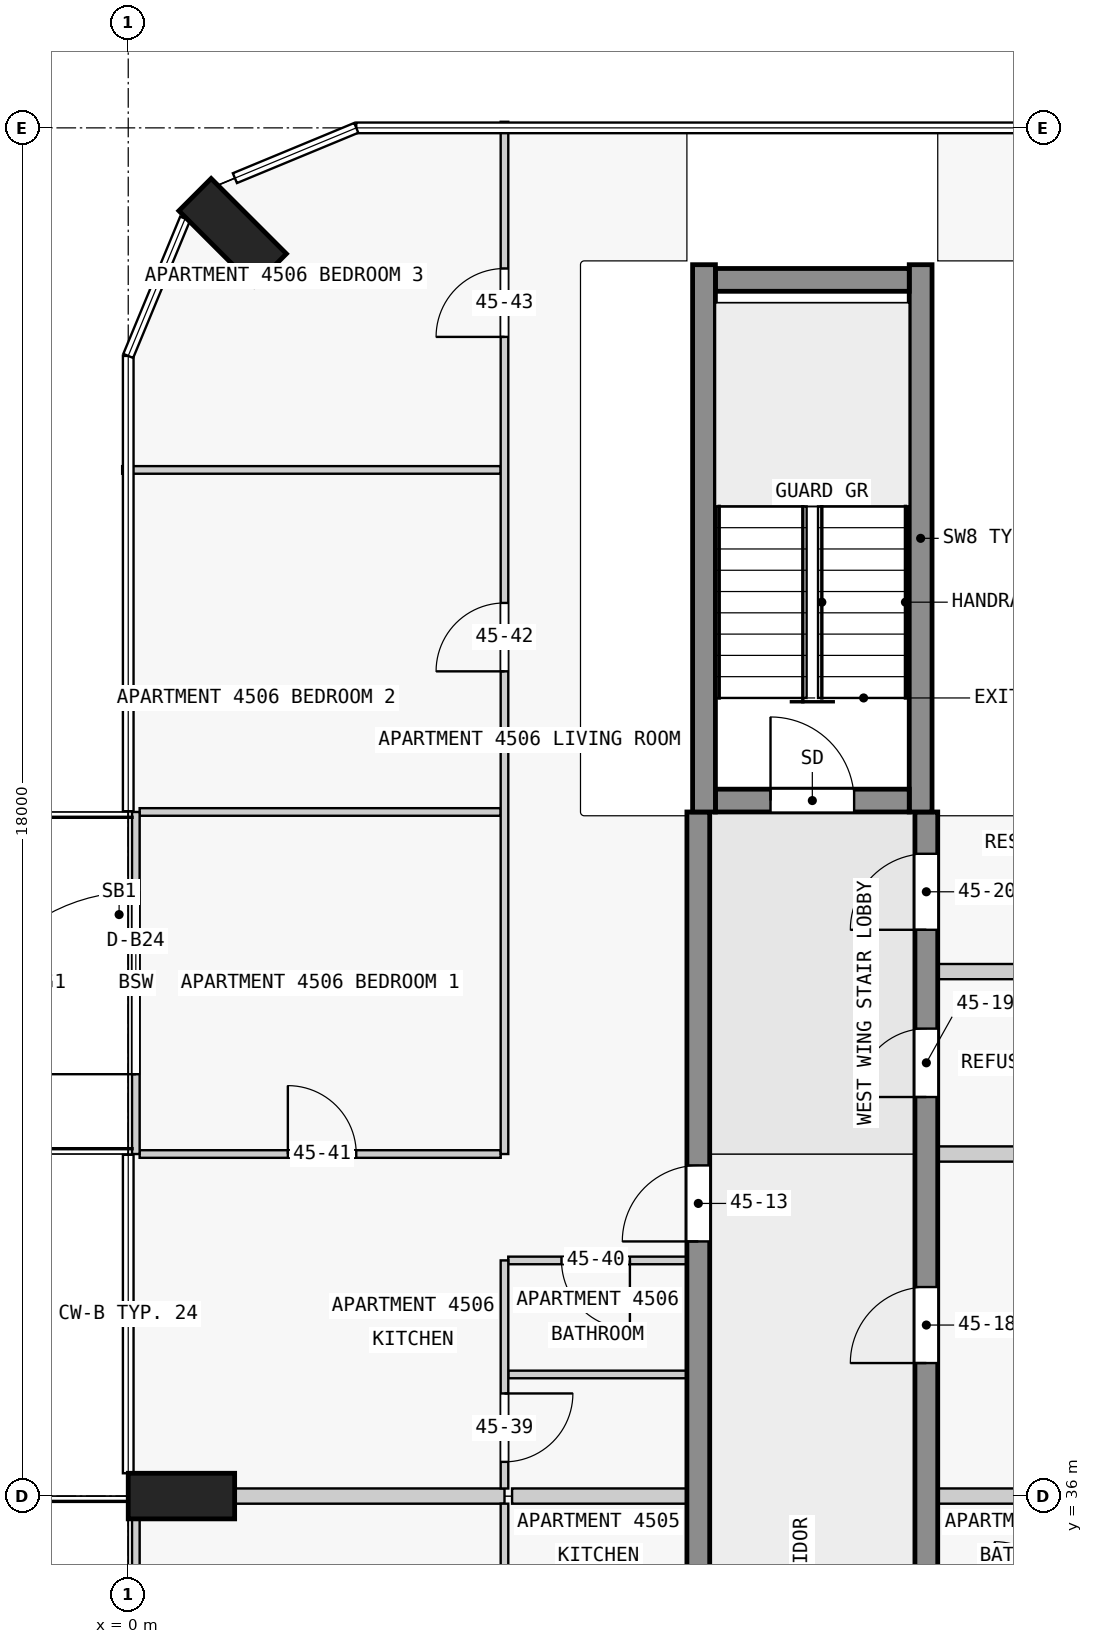
"""IFC4 building model, lengths in metres.
Left out: names, types, materials, properties, quantities, classifications, styles, units other than length and angle.
Written with IfcOpenShell. Run it as: python <this file> out.ifc"""

import sys

from ifc_helpers import new_model, si_unit, direction, frame, frame_2d, origin, origin_2d, place, context, subcontext, project, spatial, rectangle, extrude, element, fill, save


model = new_model("IFC4")
c1 = context("Model", 3, precision=1e-05, world=origin(), true_north=direction((0.0, 1.0)))
c2 = subcontext(c1, "Body", "Model", "MODEL_VIEW")
j1 = project(units=[si_unit("LENGTHUNIT", "METRE"), si_unit("PLANEANGLEUNIT", "RADIAN")], contexts=[c1])
p1 = place(None, origin())
s1 = spatial("IfcSite", under=j1, at=p1, CompositionType="ELEMENT")
p2 = place(p1, origin())
s2 = spatial("IfcBuilding", under=s1, at=p2, CompositionType="ELEMENT")
p3 = place(p2, frame((0.0, 0.0, 174.4)))
s3 = spatial("IfcBuildingStorey", under=s2, at=p3, CompositionType="ELEMENT", Elevation=174.4)
for number, where, z_axis, x_axis in (
    (1, (1.374, 52.626, 0.0), (0.0, 0.0, 1.0), (0.707, 0.707, 0.0)),
    (2, (0.7, 36.0, 0.0), (0.0, 0.0, 1.0), (0.0, 1.0, 0.0)),
):
    element("IfcColumn", number, at=place(p3, frame(where, z_axis=z_axis, x_axis=x_axis)), inside=s3, PredefinedType="COLUMN", context=c2, shape_type="SweptSolid", body=[
        extrude(rectangle(XDim=0.6, YDim=1.4, at=origin_2d()), origin(), (0.0, 0.0, 1.0), 3.5),
    ])
p4 = place(p3, frame((7.725, 45.15, 0.0), z_axis=(0.0, 0.0, 1.0), x_axis=(1.0, 0.0, 0.0)))
e3 = element("IfcWall", 3, at=p4, inside=s3, PredefinedType="SHEAR", context=c2, shape_type="SweptSolid", body=[
    extrude(rectangle(XDim=2.55, YDim=0.3, at=frame_2d((1.275, 0.0))), origin(), (0.0, 0.0, 1.0), 3.5),
])
p5 = place(p4, frame((0.725, 0.0, 0.0)))
e4 = element("IfcOpeningElement", 4, at=p5, cuts=e3, PredefinedType="OPENING", context=c2, shape_type="SweptSolid", body=[
    extrude(rectangle(XDim=1.1, YDim=2.1, at=frame_2d((0.55, 1.05))), frame((0.0, 0.16, 0.0), z_axis=(0.0, -1.0, 0.0), x_axis=(1.0, 0.0, 0.0)), (0.0, 0.0, 1.0), 0.32),
])
p6 = place(p3, frame((7.725, 52.0, 0.0), z_axis=(0.0, 0.0, 1.0), x_axis=(1.0, 0.0, 0.0)))
e5 = element("IfcWall", 5, at=p6, inside=s3, PredefinedType="SHEAR", context=c2, shape_type="SweptSolid", body=[
    extrude(rectangle(XDim=2.55, YDim=0.3, at=frame_2d((1.275, 0.0))), origin(), (0.0, 0.0, 1.0), 3.5),
])
for number, where, z_axis, x_axis in (
    (6, (7.575, 45.0, 0.0), (0.0, 0.0, 1.0), (0.0, 1.0, 0.0)),
    (7, (10.425, 45.0, 0.0), (0.0, 0.0, 1.0), (0.0, 1.0, 0.0)),
):
    element("IfcWall", number, at=place(p3, frame(where, z_axis=z_axis, x_axis=x_axis)), inside=s3, PredefinedType="SHEAR", context=c2, shape_type="SweptSolid", body=[
        extrude(rectangle(XDim=7.2, YDim=0.3, at=frame_2d((3.6, 0.0))), origin(), (0.0, 0.0, 1.0), 3.5),
    ])
p7 = place(p3, frame((7.5, 18.0, 0.0), z_axis=(0.0, 0.0, 1.0), x_axis=(0.0, 1.0, 0.0)))
e8 = element("IfcWall", 8, at=p7, inside=s3, PredefinedType="SHEAR", context=c2, shape_type="SweptSolid", body=[
    extrude(rectangle(XDim=27.0, YDim=0.3, at=frame_2d((13.5, 0.0))), origin(), (0.0, 0.0, 1.0), 3.25),
])
p8 = place(p7, frame((1.75, 0.0, 0.0)))
e9 = element("IfcOpeningElement", 9, at=p8, cuts=e8, PredefinedType="OPENING", context=c2, shape_type="SweptSolid", body=[
    extrude(rectangle(XDim=1.0, YDim=2.1, at=frame_2d((0.5, 1.05))), frame((0.0, 0.16, 0.0), z_axis=(0.0, -1.0, 0.0), x_axis=(1.0, 0.0, 0.0)), (0.0, 0.0, 1.0), 0.32),
])
p9 = place(p7, frame((5.85, 0.0, 0.0)))
e10 = element("IfcOpeningElement", 10, at=p9, cuts=e8, PredefinedType="OPENING", context=c2, shape_type="SweptSolid", body=[
    extrude(rectangle(XDim=1.8, YDim=2.1, at=frame_2d((0.9, 1.05))), frame((0.0, 0.16, 0.0), z_axis=(0.0, -1.0, 0.0), x_axis=(1.0, 0.0, 0.0)), (0.0, 0.0, 1.0), 0.32),
])
p10 = place(p7, frame((13.05, 0.0, 0.0)))
e11 = element("IfcOpeningElement", 11, at=p10, cuts=e8, PredefinedType="OPENING", context=c2, shape_type="SweptSolid", body=[
    extrude(rectangle(XDim=1.0, YDim=2.1, at=frame_2d((0.5, 1.05))), frame((0.0, 0.16, 0.0), z_axis=(0.0, -1.0, 0.0), x_axis=(1.0, 0.0, 0.0)), (0.0, 0.0, 1.0), 0.32),
])
p11 = place(p7, frame((21.35, 0.0, 0.0)))
e12 = element("IfcOpeningElement", 12, at=p11, cuts=e8, PredefinedType="OPENING", context=c2, shape_type="SweptSolid", body=[
    extrude(rectangle(XDim=1.0, YDim=2.1, at=frame_2d((0.5, 1.05))), frame((0.0, 0.16, 0.0), z_axis=(0.0, -1.0, 0.0), x_axis=(1.0, 0.0, 0.0)), (0.0, 0.0, 1.0), 0.32),
])
p12 = place(p3, frame((10.5, 18.0, 0.0), z_axis=(0.0, 0.0, 1.0), x_axis=(0.0, 1.0, 0.0)))
e13 = element("IfcWall", 13, at=p12, inside=s3, PredefinedType="SHEAR", context=c2, shape_type="SweptSolid", body=[
    extrude(rectangle(XDim=27.0, YDim=0.3, at=frame_2d((13.5, 0.0))), origin(), (0.0, 0.0, 1.0), 3.25),
])
p13 = place(p12, frame((1.75, 0.0, 0.0)))
e14 = element("IfcOpeningElement", 14, at=p13, cuts=e13, PredefinedType="OPENING", context=c2, shape_type="SweptSolid", body=[
    extrude(rectangle(XDim=1.0, YDim=2.1, at=frame_2d((0.5, 1.05))), frame((0.0, 0.16, 0.0), z_axis=(0.0, -1.0, 0.0), x_axis=(1.0, 0.0, 0.0)), (0.0, 0.0, 1.0), 0.32),
])
p14 = place(p12, frame((6.25, 0.0, 0.0)))
e15 = element("IfcOpeningElement", 15, at=p14, cuts=e13, PredefinedType="OPENING", context=c2, shape_type="SweptSolid", body=[
    extrude(rectangle(XDim=1.0, YDim=2.1, at=frame_2d((0.5, 1.05))), frame((0.0, 0.16, 0.0), z_axis=(0.0, -1.0, 0.0), x_axis=(1.0, 0.0, 0.0)), (0.0, 0.0, 1.0), 0.32),
])
p15 = place(p12, frame((10.75, 0.0, 0.0)))
e16 = element("IfcOpeningElement", 16, at=p15, cuts=e13, PredefinedType="OPENING", context=c2, shape_type="SweptSolid", body=[
    extrude(rectangle(XDim=1.0, YDim=2.1, at=frame_2d((0.5, 1.05))), frame((0.0, 0.16, 0.0), z_axis=(0.0, -1.0, 0.0), x_axis=(1.0, 0.0, 0.0)), (0.0, 0.0, 1.0), 0.32),
])
p16 = place(p12, frame((15.25, 0.0, 0.0)))
e17 = element("IfcOpeningElement", 17, at=p16, cuts=e13, PredefinedType="OPENING", context=c2, shape_type="SweptSolid", body=[
    extrude(rectangle(XDim=1.0, YDim=2.1, at=frame_2d((0.5, 1.05))), frame((0.0, 0.16, 0.0), z_axis=(0.0, -1.0, 0.0), x_axis=(1.0, 0.0, 0.0)), (0.0, 0.0, 1.0), 0.32),
])
p17 = place(p12, frame((19.75, 0.0, 0.0)))
e18 = element("IfcOpeningElement", 18, at=p17, cuts=e13, PredefinedType="OPENING", context=c2, shape_type="SweptSolid", body=[
    extrude(rectangle(XDim=1.0, YDim=2.1, at=frame_2d((0.5, 1.05))), frame((0.0, 0.16, 0.0), z_axis=(0.0, -1.0, 0.0), x_axis=(1.0, 0.0, 0.0)), (0.0, 0.0, 1.0), 0.32),
])
p18 = place(p12, frame((23.25, 0.0, 0.0)))
e19 = element("IfcOpeningElement", 19, at=p18, cuts=e13, PredefinedType="OPENING", context=c2, shape_type="SweptSolid", body=[
    extrude(rectangle(XDim=0.9, YDim=2.1, at=frame_2d((0.45, 1.05))), frame((0.0, 0.16, 0.0), z_axis=(0.0, -1.0, 0.0), x_axis=(1.0, 0.0, 0.0)), (0.0, 0.0, 1.0), 0.32),
])
p19 = place(p12, frame((25.45, 0.0, 0.0)))
e20 = element("IfcOpeningElement", 20, at=p19, cuts=e13, PredefinedType="OPENING", context=c2, shape_type="SweptSolid", body=[
    extrude(rectangle(XDim=1.0, YDim=2.1, at=frame_2d((0.5, 1.05))), frame((0.0, 0.16, 0.0), z_axis=(0.0, -1.0, 0.0), x_axis=(1.0, 0.0, 0.0)), (0.0, 0.0, 1.0), 0.32),
])
p20 = place(p3, frame((0.1, 31.5, 0.0), z_axis=(0.0, 0.0, 1.0), x_axis=(0.0, 1.0, 0.0)))
e21 = element("IfcWall", 21, at=p20, inside=s3, PredefinedType="STANDARD", context=c2, shape_type="SweptSolid", body=[
    extrude(rectangle(XDim=4.5, YDim=0.1, at=frame_2d((2.25, 0.0))), origin(), (0.0, 0.0, 1.0), 3.25),
])
p21 = place(p20, frame((1.05, 0.0, 0.0)))
e22 = element("IfcOpeningElement", 22, at=p21, cuts=e21, PredefinedType="OPENING", context=c2, shape_type="SweptSolid", body=[
    extrude(rectangle(XDim=2.4, YDim=2.4, at=frame_2d((1.2, 1.2))), frame((0.0, 0.06, 0.0), z_axis=(0.0, -1.0, 0.0), x_axis=(1.0, 0.0, 0.0)), (0.0, 0.0, 1.0), 0.12),
])
p22 = place(p3, frame((0.1, 40.5, 0.0), z_axis=(0.0, 0.0, 1.0), x_axis=(0.0, 1.0, 0.0)))
e23 = element("IfcWall", 23, at=p22, inside=s3, PredefinedType="STANDARD", context=c2, shape_type="SweptSolid", body=[
    extrude(rectangle(XDim=4.5, YDim=0.1, at=frame_2d((2.25, 0.0))), origin(), (0.0, 0.0, 1.0), 3.25),
])
p23 = place(p22, frame((1.05, 0.0, 0.0)))
e24 = element("IfcOpeningElement", 24, at=p23, cuts=e23, PredefinedType="OPENING", context=c2, shape_type="SweptSolid", body=[
    extrude(rectangle(XDim=2.4, YDim=2.4, at=frame_2d((1.2, 1.2))), frame((0.0, 0.06, 0.0), z_axis=(0.0, -1.0, 0.0), x_axis=(1.0, 0.0, 0.0)), (0.0, 0.0, 1.0), 0.12),
])
for number, where, z_axis, x_axis in (
    (25, (7.35, 36.0, 0.0), (0.0, 0.0, 1.0), (-1.0, 0.0, 0.0)),
    (26, (12.95, 36.0, 0.0), (0.0, 0.0, 1.0), (-1.0, 0.0, 0.0)),
):
    element("IfcWall", number, at=place(p3, frame(where, z_axis=z_axis, x_axis=x_axis)), inside=s3, PredefinedType="PARTITIONING", context=c2, shape_type="SweptSolid", body=[
        extrude(rectangle(XDim=2.3, YDim=0.2, at=frame_2d((1.15, 0.0))), origin(), (0.0, 0.0, 1.0), 3.25),
    ])
p24 = place(p3, frame((1.4, 36.0, 0.0), z_axis=(0.0, 0.0, 1.0), x_axis=(1.0, 0.0, 0.0)))
e27 = element("IfcWall", 27, at=p24, inside=s3, PredefinedType="PARTITIONING", context=c2, shape_type="SweptSolid", body=[
    extrude(rectangle(XDim=3.55, YDim=0.2, at=frame_2d((1.775, 0.0))), origin(), (0.0, 0.0, 1.0), 3.25),
])
p25 = place(p3, frame((7.35, 37.6, 0.0), z_axis=(0.0, 0.0, 1.0), x_axis=(-1.0, 0.0, 0.0)))
e28 = element("IfcWall", 28, at=p25, inside=s3, PredefinedType="PARTITIONING", context=c2, shape_type="SweptSolid", body=[
    extrude(rectangle(XDim=2.35, YDim=0.1, at=frame_2d((1.175, 0.0))), origin(), (0.0, 0.0, 1.0), 3.25),
])
p26 = place(p3, frame((7.35, 39.1, 0.0), z_axis=(0.0, 0.0, 1.0), x_axis=(-1.0, 0.0, 0.0)))
e29 = element("IfcWall", 29, at=p26, inside=s3, PredefinedType="PARTITIONING", context=c2, shape_type="SweptSolid", body=[
    extrude(rectangle(XDim=2.35, YDim=0.1, at=frame_2d((1.175, 0.0))), origin(), (0.0, 0.0, 1.0), 3.25),
])
p27 = place(p26, frame((0.75, 0.0, 0.0)))
e30 = element("IfcOpeningElement", 30, at=p27, cuts=e29, PredefinedType="OPENING", context=c2, shape_type="SweptSolid", body=[
    extrude(rectangle(XDim=0.9, YDim=2.1, at=frame_2d((0.45, 1.05))), frame((0.0, 0.06, 0.0), z_axis=(0.0, -1.0, 0.0), x_axis=(1.0, 0.0, 0.0)), (0.0, 0.0, 1.0), 0.12),
])
p28 = place(p3, frame((0.15, 40.5, 0.0), z_axis=(0.0, 0.0, 1.0), x_axis=(1.0, 0.0, 0.0)))
e31 = element("IfcWall", 31, at=p28, inside=s3, PredefinedType="PARTITIONING", context=c2, shape_type="SweptSolid", body=[
    extrude(rectangle(XDim=4.75, YDim=0.1, at=frame_2d((2.375, 0.0))), origin(), (0.0, 0.0, 1.0), 3.25),
])
p29 = place(p28, frame((1.95, 0.0, 0.0)))
e32 = element("IfcOpeningElement", 32, at=p29, cuts=e31, PredefinedType="OPENING", context=c2, shape_type="SweptSolid", body=[
    extrude(rectangle(XDim=0.9, YDim=2.1, at=frame_2d((0.45, 1.05))), frame((0.0, 0.06, 0.0), z_axis=(0.0, -1.0, 0.0), x_axis=(1.0, 0.0, 0.0)), (0.0, 0.0, 1.0), 0.12),
])
p30 = place(p3, frame((18.08, 40.5, 0.0), z_axis=(0.0, 0.0, 1.0), x_axis=(-1.0, 0.0, 0.0)))
e33 = element("IfcWall", 33, at=p30, inside=s3, PredefinedType="PARTITIONING", context=c2, shape_type="SweptSolid", body=[
    extrude(rectangle(XDim=7.43, YDim=0.2, at=frame_2d((3.715, 0.0))), origin(), (0.0, 0.0, 1.0), 3.25),
])
p31 = place(p3, frame((13.05, 42.9, 0.0), z_axis=(0.0, 0.0, 1.0), x_axis=(-1.0, 0.0, 0.0)))
e34 = element("IfcWall", 34, at=p31, inside=s3, PredefinedType="PARTITIONING", context=c2, shape_type="SweptSolid", body=[
    extrude(rectangle(XDim=2.4, YDim=0.2, at=frame_2d((1.2, 0.0))), origin(), (0.0, 0.0, 1.0), 3.25),
])
p32 = place(p3, frame((4.9, 45.0, 0.0), z_axis=(0.0, 0.0, 1.0), x_axis=(-1.0, 0.0, 0.0)))
e35 = element("IfcWall", 35, at=p32, inside=s3, PredefinedType="PARTITIONING", context=c2, shape_type="SweptSolid", body=[
    extrude(rectangle(XDim=4.75, YDim=0.1, at=frame_2d((2.375, 0.0))), origin(), (0.0, 0.0, 1.0), 3.25),
])
p33 = place(p3, frame((4.9, 49.5, 0.0), z_axis=(0.0, 0.0, 1.0), x_axis=(-1.0, 0.0, 0.0)))
e36 = element("IfcWall", 36, at=p33, inside=s3, PredefinedType="PARTITIONING", context=c2, shape_type="SweptSolid", body=[
    extrude(rectangle(XDim=4.98, YDim=0.1, at=frame_2d((2.49, 0.0))), origin(), (0.0, 0.0, 1.0), 3.25),
])
p34 = place(p3, frame((4.95, 35.9, 0.0), z_axis=(0.0, 0.0, 1.0), x_axis=(0.0, -1.0, 0.0)))
e37 = element("IfcWall", 37, at=p34, inside=s3, PredefinedType="PARTITIONING", context=c2, shape_type="SweptSolid", body=[
    extrude(rectangle(XDim=1.7, YDim=0.1, at=frame_2d((0.85, 0.0))), origin(), (0.0, 0.0, 1.0), 3.25),
])
p35 = place(p3, frame((4.95, 39.1, 0.0), z_axis=(0.0, 0.0, 1.0), x_axis=(0.0, -1.0, 0.0)))
e38 = element("IfcWall", 38, at=p35, inside=s3, PredefinedType="PARTITIONING", context=c2, shape_type="SweptSolid", body=[
    extrude(rectangle(XDim=3.0, YDim=0.1, at=frame_2d((1.5, 0.0))), origin(), (0.0, 0.0, 1.0), 3.25),
])
p36 = place(p35, frame((1.75, 0.0, 0.0)))
e39 = element("IfcOpeningElement", 39, at=p36, cuts=e38, PredefinedType="OPENING", context=c2, shape_type="SweptSolid", body=[
    extrude(rectangle(XDim=0.9, YDim=2.1, at=frame_2d((0.45, 1.05))), frame((0.0, 0.06, 0.0), z_axis=(0.0, -1.0, 0.0), x_axis=(1.0, 0.0, 0.0)), (0.0, 0.0, 1.0), 0.12),
])
p37 = place(p3, frame((4.95, 40.5, 0.0), z_axis=(0.0, 0.0, 1.0), x_axis=(0.0, 1.0, 0.0)))
e40 = element("IfcWall", 40, at=p37, inside=s3, PredefinedType="PARTITIONING", context=c2, shape_type="SweptSolid", body=[
    extrude(rectangle(XDim=13.58, YDim=0.1, at=frame_2d((6.79, 0.0))), origin(), (0.0, 0.0, 1.0), 3.25),
])
p38 = place(p37, frame((6.35, 0.0, 0.0)))
e41 = element("IfcOpeningElement", 41, at=p38, cuts=e40, PredefinedType="OPENING", context=c2, shape_type="SweptSolid", body=[
    extrude(rectangle(XDim=0.9, YDim=2.1, at=frame_2d((0.45, 1.05))), frame((0.0, 0.06, 0.0), z_axis=(0.0, -1.0, 0.0), x_axis=(1.0, 0.0, 0.0)), (0.0, 0.0, 1.0), 0.12),
])
p39 = place(p37, frame((10.75, 0.0, 0.0)))
e42 = element("IfcOpeningElement", 42, at=p39, cuts=e40, PredefinedType="OPENING", context=c2, shape_type="SweptSolid", body=[
    extrude(rectangle(XDim=0.9, YDim=2.1, at=frame_2d((0.45, 1.05))), frame((0.0, 0.06, 0.0), z_axis=(0.0, -1.0, 0.0), x_axis=(1.0, 0.0, 0.0)), (0.0, 0.0, 1.0), 0.12),
])
p40 = place(p23, origin())
e43 = element("IfcDoor", 43, at=p40, inside=s3, OperationType="SINGLE_SWING_LEFT", PredefinedType="DOOR", context=c2, shape_type="SweptSolid", body=[
    extrude(rectangle(XDim=2.4, YDim=2.4, at=frame_2d((1.2, 1.2))), frame((0.0, 0.025, 0.0), z_axis=(0.0, -1.0, 0.0), x_axis=(1.0, 0.0, 0.0)), (0.0, 0.0, 1.0), 0.05),
])
fill(e24, e43)
p41 = place(p5, origin())
e44 = element("IfcDoor", 44, at=p41, inside=s3, OperationType="SINGLE_SWING_LEFT", PredefinedType="DOOR", context=c2, shape_type="SweptSolid", body=[
    extrude(rectangle(XDim=1.1, YDim=2.1, at=frame_2d((0.55, 1.05))), frame((0.0, 0.025, 0.0), z_axis=(0.0, -1.0, 0.0), x_axis=(1.0, 0.0, 0.0)), (0.0, 0.0, 1.0), 0.05),
])
fill(e4, e44)
p42 = place(p11, origin())
e45 = element("IfcDoor", 45, at=p42, inside=s3, OperationType="SINGLE_SWING_RIGHT", PredefinedType="DOOR", context=c2, shape_type="SweptSolid", body=[
    extrude(rectangle(XDim=1.0, YDim=2.1, at=frame_2d((0.5, 1.05))), frame((0.0, 0.025, 0.0), z_axis=(0.0, -1.0, 0.0), x_axis=(1.0, 0.0, 0.0)), (0.0, 0.0, 1.0), 0.05),
])
fill(e12, e45)
p43 = place(p17, origin())
e46 = element("IfcDoor", 46, at=p43, inside=s3, OperationType="SINGLE_SWING_RIGHT", PredefinedType="DOOR", context=c2, shape_type="SweptSolid", body=[
    extrude(rectangle(XDim=1.0, YDim=2.1, at=frame_2d((0.5, 1.05))), frame((0.0, 0.025, 0.0), z_axis=(0.0, -1.0, 0.0), x_axis=(1.0, 0.0, 0.0)), (0.0, 0.0, 1.0), 0.05),
])
fill(e18, e46)
p44 = place(p18, origin())
e47 = element("IfcDoor", 47, at=p44, inside=s3, OperationType="SINGLE_SWING_RIGHT", PredefinedType="DOOR", context=c2, shape_type="SweptSolid", body=[
    extrude(rectangle(XDim=0.9, YDim=2.1, at=frame_2d((0.45, 1.05))), frame((0.0, 0.025, 0.0), z_axis=(0.0, -1.0, 0.0), x_axis=(1.0, 0.0, 0.0)), (0.0, 0.0, 1.0), 0.05),
])
fill(e19, e47)
p45 = place(p19, origin())
e48 = element("IfcDoor", 48, at=p45, inside=s3, OperationType="SINGLE_SWING_RIGHT", PredefinedType="DOOR", context=c2, shape_type="SweptSolid", body=[
    extrude(rectangle(XDim=1.0, YDim=2.1, at=frame_2d((0.5, 1.05))), frame((0.0, 0.025, 0.0), z_axis=(0.0, -1.0, 0.0), x_axis=(1.0, 0.0, 0.0)), (0.0, 0.0, 1.0), 0.05),
])
fill(e20, e48)
p46 = place(p36, origin())
e49 = element("IfcDoor", 49, at=p46, inside=s3, OperationType="SINGLE_SWING_RIGHT", PredefinedType="DOOR", context=c2, shape_type="SweptSolid", body=[
    extrude(rectangle(XDim=0.9, YDim=2.1, at=frame_2d((0.45, 1.05))), frame((0.0, 0.025, 0.0), z_axis=(0.0, -1.0, 0.0), x_axis=(1.0, 0.0, 0.0)), (0.0, 0.0, 1.0), 0.05),
])
fill(e39, e49)
p47 = place(p27, origin())
e50 = element("IfcDoor", 50, at=p47, inside=s3, OperationType="SINGLE_SWING_RIGHT", PredefinedType="DOOR", context=c2, shape_type="SweptSolid", body=[
    extrude(rectangle(XDim=0.9, YDim=2.1, at=frame_2d((0.45, 1.05))), frame((0.0, 0.025, 0.0), z_axis=(0.0, -1.0, 0.0), x_axis=(1.0, 0.0, 0.0)), (0.0, 0.0, 1.0), 0.05),
])
fill(e30, e50)
p48 = place(p29, origin())
e51 = element("IfcDoor", 51, at=p48, inside=s3, OperationType="SINGLE_SWING_RIGHT", PredefinedType="DOOR", context=c2, shape_type="SweptSolid", body=[
    extrude(rectangle(XDim=0.9, YDim=2.1, at=frame_2d((0.45, 1.05))), frame((0.0, 0.025, 0.0), z_axis=(0.0, -1.0, 0.0), x_axis=(1.0, 0.0, 0.0)), (0.0, 0.0, 1.0), 0.05),
])
fill(e32, e51)
p49 = place(p38, origin())
e52 = element("IfcDoor", 52, at=p49, inside=s3, OperationType="SINGLE_SWING_RIGHT", PredefinedType="DOOR", context=c2, shape_type="SweptSolid", body=[
    extrude(rectangle(XDim=0.9, YDim=2.1, at=frame_2d((0.45, 1.05))), frame((0.0, 0.025, 0.0), z_axis=(0.0, -1.0, 0.0), x_axis=(1.0, 0.0, 0.0)), (0.0, 0.0, 1.0), 0.05),
])
fill(e41, e52)
p50 = place(p39, origin())
e53 = element("IfcDoor", 53, at=p50, inside=s3, OperationType="SINGLE_SWING_RIGHT", PredefinedType="DOOR", context=c2, shape_type="SweptSolid", body=[
    extrude(rectangle(XDim=0.9, YDim=2.1, at=frame_2d((0.45, 1.05))), frame((0.0, 0.025, 0.0), z_axis=(0.0, -1.0, 0.0), x_axis=(1.0, 0.0, 0.0)), (0.0, 0.0, 1.0), 0.05),
])
fill(e42, e53)
save(model, sys.argv[1])
